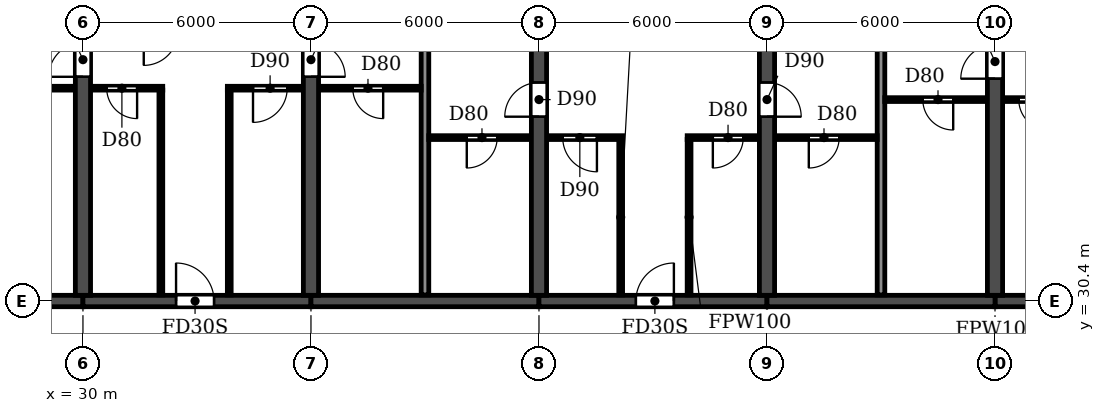
"""IFC4 building model, lengths in metres.
Left out: names, types, materials, properties, quantities, classifications, styles, units other than length and angle.
Written with IfcOpenShell. Run it as: python <this file> out.ifc"""

import sys

from ifc_helpers import new_model, si_unit, direction, frame, frame_2d, origin, place, context, subcontext, project, spatial, rectangle, extrude, element, fill, save


model = new_model("IFC4")
c1 = context("Model", 3, precision=1e-05, world=origin(), true_north=direction((0.0, 1.0)))
c2 = subcontext(c1, "Body", "Model", "MODEL_VIEW")
j1 = project(units=[si_unit("LENGTHUNIT", "METRE"), si_unit("PLANEANGLEUNIT", "RADIAN")], contexts=[c1])
p1 = place(None, origin())
s1 = spatial("IfcSite", under=j1, at=p1, CompositionType="ELEMENT")
p2 = place(p1, origin())
s2 = spatial("IfcBuilding", under=s1, at=p2, CompositionType="ELEMENT")
p3 = place(p2, frame((0.0, 0.0, 43.2)))
s3 = spatial("IfcBuildingStorey", under=s2, at=p3, CompositionType="ELEMENT", Elevation=43.2)
p4 = place(p3, frame((30.0, 30.55, 0.0), z_axis=(0.0, 0.0, 1.0), x_axis=(0.0, 1.0, 0.0)))
e1 = element("IfcWall", 1, at=p4, inside=s3, PredefinedType="SHEAR", context=c2, shape_type="SweptSolid", body=[
    extrude(rectangle(XDim=14.05, YDim=0.4, at=frame_2d((7.025, 0.0))), origin(), (0.0, 0.0, 1.0), 3.05),
])
p5 = place(p4, frame((5.75, 0.0, 0.0)))
e2 = element("IfcOpeningElement", 2, at=p5, cuts=e1, PredefinedType="OPENING", context=c2, shape_type="SweptSolid", body=[
    extrude(rectangle(XDim=0.9, YDim=2.1, at=frame_2d((0.45, 1.05))), frame((0.0, 0.21, 0.0), z_axis=(0.0, -1.0, 0.0), x_axis=(1.0, 0.0, 0.0)), (0.0, 0.0, 1.0), 0.42),
])
p6 = place(p3, frame((36.0, 30.55, 0.0), z_axis=(0.0, 0.0, 1.0), x_axis=(0.0, 1.0, 0.0)))
e3 = element("IfcWall", 3, at=p6, inside=s3, PredefinedType="SHEAR", context=c2, shape_type="SweptSolid", body=[
    extrude(rectangle(XDim=14.05, YDim=0.4, at=frame_2d((7.025, 0.0))), origin(), (0.0, 0.0, 1.0), 3.05),
])
p7 = place(p6, frame((5.75, 0.0, 0.0)))
e4 = element("IfcOpeningElement", 4, at=p7, cuts=e3, PredefinedType="OPENING", context=c2, shape_type="SweptSolid", body=[
    extrude(rectangle(XDim=0.9, YDim=2.1, at=frame_2d((0.45, 1.05))), frame((0.0, 0.21, 0.0), z_axis=(0.0, -1.0, 0.0), x_axis=(1.0, 0.0, 0.0)), (0.0, 0.0, 1.0), 0.42),
])
p8 = place(p3, frame((42.0, 30.55, 0.0), z_axis=(0.0, 0.0, 1.0), x_axis=(0.0, 1.0, 0.0)))
e5 = element("IfcWall", 5, at=p8, inside=s3, PredefinedType="SHEAR", context=c2, shape_type="SweptSolid", body=[
    extrude(rectangle(XDim=14.05, YDim=0.4, at=frame_2d((7.025, 0.0))), origin(), (0.0, 0.0, 1.0), 3.05),
])
p9 = place(p8, frame((4.7, 0.0, 0.0)))
e6 = element("IfcOpeningElement", 6, at=p9, cuts=e5, PredefinedType="OPENING", context=c2, shape_type="SweptSolid", body=[
    extrude(rectangle(XDim=0.9, YDim=2.1, at=frame_2d((0.45, 1.05))), frame((0.0, 0.21, 0.0), z_axis=(0.0, -1.0, 0.0), x_axis=(1.0, 0.0, 0.0)), (0.0, 0.0, 1.0), 0.42),
])
p10 = place(p3, frame((48.0, 30.55, 0.0), z_axis=(0.0, 0.0, 1.0), x_axis=(0.0, 1.0, 0.0)))
e7 = element("IfcWall", 7, at=p10, inside=s3, PredefinedType="SHEAR", context=c2, shape_type="SweptSolid", body=[
    extrude(rectangle(XDim=14.05, YDim=0.4, at=frame_2d((7.025, 0.0))), origin(), (0.0, 0.0, 1.0), 3.05),
])
p11 = place(p10, frame((4.7, 0.0, 0.0)))
e8 = element("IfcOpeningElement", 8, at=p11, cuts=e7, PredefinedType="OPENING", context=c2, shape_type="SweptSolid", body=[
    extrude(rectangle(XDim=0.9, YDim=2.1, at=frame_2d((0.45, 1.05))), frame((0.0, 0.21, 0.0), z_axis=(0.0, -1.0, 0.0), x_axis=(1.0, 0.0, 0.0)), (0.0, 0.0, 1.0), 0.42),
])
p12 = place(p3, frame((54.0, 30.55, 0.0), z_axis=(0.0, 0.0, 1.0), x_axis=(0.0, 1.0, 0.0)))
e9 = element("IfcWall", 9, at=p12, inside=s3, PredefinedType="SHEAR", context=c2, shape_type="SweptSolid", body=[
    extrude(rectangle(XDim=14.05, YDim=0.4, at=frame_2d((7.025, 0.0))), origin(), (0.0, 0.0, 1.0), 3.05),
])
p13 = place(p12, frame((5.7, 0.0, 0.0)))
e10 = element("IfcOpeningElement", 10, at=p13, cuts=e9, PredefinedType="OPENING", context=c2, shape_type="SweptSolid", body=[
    extrude(rectangle(XDim=0.9, YDim=2.1, at=frame_2d((0.45, 1.05))), frame((0.0, 0.21, 0.0), z_axis=(0.0, -1.0, 0.0), x_axis=(1.0, 0.0, 0.0)), (0.0, 0.0, 1.0), 0.42),
])
p14 = place(p3, frame((24.0, 30.4, 0.0), z_axis=(0.0, 0.0, 1.0), x_axis=(1.0, 0.0, 0.0)))
e11 = element("IfcWall", 11, at=p14, inside=s3, PredefinedType="SHEAR", context=c2, shape_type="SweptSolid", body=[
    extrude(rectangle(XDim=6.0, YDim=0.3, at=frame_2d((3.0, 0.0))), origin(), (0.0, 0.0, 1.0), 2.45),
])
p15 = place(p3, frame((30.0, 30.4, 0.0), z_axis=(0.0, 0.0, 1.0), x_axis=(1.0, 0.0, 0.0)))
e12 = element("IfcWall", 12, at=p15, inside=s3, PredefinedType="SHEAR", context=c2, shape_type="SweptSolid", body=[
    extrude(rectangle(XDim=6.0, YDim=0.3, at=frame_2d((3.0, 0.0))), origin(), (0.0, 0.0, 1.0), 2.45),
])
p16 = place(p15, frame((2.45, 0.0, 0.0)))
e13 = element("IfcOpeningElement", 13, at=p16, cuts=e12, PredefinedType="OPENING", context=c2, shape_type="SweptSolid", body=[
    extrude(rectangle(XDim=1.0, YDim=2.1, at=frame_2d((0.5, 1.05))), frame((0.0, 0.16, 0.0), z_axis=(0.0, -1.0, 0.0), x_axis=(1.0, 0.0, 0.0)), (0.0, 0.0, 1.0), 0.32),
])
p17 = place(p3, frame((36.0, 30.4, 0.0), z_axis=(0.0, 0.0, 1.0), x_axis=(1.0, 0.0, 0.0)))
e14 = element("IfcWall", 14, at=p17, inside=s3, PredefinedType="SHEAR", context=c2, shape_type="SweptSolid", body=[
    extrude(rectangle(XDim=6.0, YDim=0.3, at=frame_2d((3.0, 0.0))), origin(), (0.0, 0.0, 1.0), 2.45),
])
p18 = place(p3, frame((42.0, 30.4, 0.0), z_axis=(0.0, 0.0, 1.0), x_axis=(1.0, 0.0, 0.0)))
e15 = element("IfcWall", 15, at=p18, inside=s3, PredefinedType="SHEAR", context=c2, shape_type="SweptSolid", body=[
    extrude(rectangle(XDim=6.0, YDim=0.3, at=frame_2d((3.0, 0.0))), origin(), (0.0, 0.0, 1.0), 2.45),
])
p19 = place(p18, frame((2.55, 0.0, 0.0)))
e16 = element("IfcOpeningElement", 16, at=p19, cuts=e15, PredefinedType="OPENING", context=c2, shape_type="SweptSolid", body=[
    extrude(rectangle(XDim=1.0, YDim=2.1, at=frame_2d((0.5, 1.05))), frame((0.0, 0.16, 0.0), z_axis=(0.0, -1.0, 0.0), x_axis=(1.0, 0.0, 0.0)), (0.0, 0.0, 1.0), 0.32),
])
p20 = place(p3, frame((48.0, 30.4, 0.0), z_axis=(0.0, 0.0, 1.0), x_axis=(1.0, 0.0, 0.0)))
e17 = element("IfcWall", 17, at=p20, inside=s3, PredefinedType="SHEAR", context=c2, shape_type="SweptSolid", body=[
    extrude(rectangle(XDim=6.0, YDim=0.3, at=frame_2d((3.0, 0.0))), origin(), (0.0, 0.0, 1.0), 2.45),
])
p21 = place(p3, frame((54.0, 30.4, 0.0), z_axis=(0.0, 0.0, 1.0), x_axis=(1.0, 0.0, 0.0)))
e18 = element("IfcWall", 18, at=p21, inside=s3, PredefinedType="SHEAR", context=c2, shape_type="SweptSolid", body=[
    extrude(rectangle(XDim=6.0, YDim=0.3, at=frame_2d((3.0, 0.0))), origin(), (0.0, 0.0, 1.0), 2.45),
])
p22 = place(p21, frame((2.45, 0.0, 0.0)))
e19 = element("IfcOpeningElement", 19, at=p22, cuts=e18, PredefinedType="OPENING", context=c2, shape_type="SweptSolid", body=[
    extrude(rectangle(XDim=1.0, YDim=2.1, at=frame_2d((0.5, 1.05))), frame((0.0, 0.16, 0.0), z_axis=(0.0, -1.0, 0.0), x_axis=(1.0, 0.0, 0.0)), (0.0, 0.0, 1.0), 0.32),
])
for number, where, z_axis, x_axis in (
    (20, (39.0, 30.56, 0.0), (0.0, 0.0, 1.0), (0.0, 1.0, 0.0)),
    (21, (51.0, 30.56, 0.0), (0.0, 0.0, 1.0), (0.0, 1.0, 0.0)),
):
    element("IfcWall", number, at=place(p3, frame(where, z_axis=z_axis, x_axis=x_axis)), inside=s3, PredefinedType="PARTITIONING", context=c2, shape_type="SweptSolid", body=[
        extrude(rectangle(XDim=14.18, YDim=0.2, at=frame_2d((7.09, 0.0))), origin(), (0.0, 0.0, 1.0), 3.05),
    ])
p23 = place(p3, frame((39.1, 34.7, 0.0), z_axis=(0.0, 0.0, 1.0), x_axis=(1.0, 0.0, 0.0)))
e22 = element("IfcWall", 22, at=p23, inside=s3, PredefinedType="PARTITIONING", context=c2, shape_type="SweptSolid", body=[
    extrude(rectangle(XDim=2.69, YDim=0.1, at=frame_2d((1.345, 0.0))), origin(), (0.0, 0.0, 1.0), 3.05),
])
p24 = place(p23, frame((1.0, 0.0, 0.0)))
e23 = element("IfcOpeningElement", 23, at=p24, cuts=e22, PredefinedType="OPENING", context=c2, shape_type="SweptSolid", body=[
    extrude(rectangle(XDim=0.8, YDim=2.1, at=frame_2d((0.4, 1.05))), frame((0.0, 0.06, 0.0), z_axis=(0.0, -1.0, 0.0), x_axis=(1.0, 0.0, 0.0)), (0.0, 0.0, 1.0), 0.12),
])
p25 = place(p3, frame((42.21, 34.7, 0.0), z_axis=(0.0, 0.0, 1.0), x_axis=(1.0, 0.0, 0.0)))
e24 = element("IfcWall", 24, at=p25, inside=s3, PredefinedType="PARTITIONING", context=c2, shape_type="SweptSolid", body=[
    extrude(rectangle(XDim=1.99, YDim=0.1, at=frame_2d((0.995, 0.0))), origin(), (0.0, 0.0, 1.0), 3.05),
])
p26 = place(p25, frame((0.415, 0.0, 0.0)))
e25 = element("IfcOpeningElement", 25, at=p26, cuts=e24, PredefinedType="OPENING", context=c2, shape_type="SweptSolid", body=[
    extrude(rectangle(XDim=0.9, YDim=2.1, at=frame_2d((0.45, 1.05))), frame((0.0, 0.06, 0.0), z_axis=(0.0, -1.0, 0.0), x_axis=(1.0, 0.0, 0.0)), (0.0, 0.0, 1.0), 0.12),
])
p27 = place(p3, frame((45.9, 34.7, 0.0), z_axis=(0.0, 0.0, 1.0), x_axis=(1.0, 0.0, 0.0)))
e26 = element("IfcWall", 26, at=p27, inside=s3, PredefinedType="PARTITIONING", context=c2, shape_type="SweptSolid", body=[
    extrude(rectangle(XDim=1.89, YDim=0.1, at=frame_2d((0.945, 0.0))), origin(), (0.0, 0.0, 1.0), 3.05),
])
p28 = place(p27, frame((0.675, 0.0, 0.0)))
e27 = element("IfcOpeningElement", 27, at=p28, cuts=e26, PredefinedType="OPENING", context=c2, shape_type="SweptSolid", body=[
    extrude(rectangle(XDim=0.8, YDim=2.1, at=frame_2d((0.4, 1.05))), frame((0.0, 0.06, 0.0), z_axis=(0.0, -1.0, 0.0), x_axis=(1.0, 0.0, 0.0)), (0.0, 0.0, 1.0), 0.12),
])
p29 = place(p3, frame((48.21, 34.7, 0.0), z_axis=(0.0, 0.0, 1.0), x_axis=(1.0, 0.0, 0.0)))
e28 = element("IfcWall", 28, at=p29, inside=s3, PredefinedType="PARTITIONING", context=c2, shape_type="SweptSolid", body=[
    extrude(rectangle(XDim=2.69, YDim=0.1, at=frame_2d((1.345, 0.0))), origin(), (0.0, 0.0, 1.0), 3.05),
])
p30 = place(p29, frame((0.89, 0.0, 0.0)))
e29 = element("IfcOpeningElement", 29, at=p30, cuts=e28, PredefinedType="OPENING", context=c2, shape_type="SweptSolid", body=[
    extrude(rectangle(XDim=0.8, YDim=2.1, at=frame_2d((0.4, 1.05))), frame((0.0, 0.06, 0.0), z_axis=(0.0, -1.0, 0.0), x_axis=(1.0, 0.0, 0.0)), (0.0, 0.0, 1.0), 0.12),
])
p31 = place(p3, frame((51.1, 35.7, 0.0), z_axis=(0.0, 0.0, 1.0), x_axis=(1.0, 0.0, 0.0)))
e30 = element("IfcWall", 30, at=p31, inside=s3, PredefinedType="PARTITIONING", context=c2, shape_type="SweptSolid", body=[
    extrude(rectangle(XDim=2.69, YDim=0.1, at=frame_2d((1.345, 0.0))), origin(), (0.0, 0.0, 1.0), 3.05),
])
p32 = place(p31, frame((1.0, 0.0, 0.0)))
e31 = element("IfcOpeningElement", 31, at=p32, cuts=e30, PredefinedType="OPENING", context=c2, shape_type="SweptSolid", body=[
    extrude(rectangle(XDim=0.8, YDim=2.1, at=frame_2d((0.4, 1.05))), frame((0.0, 0.06, 0.0), z_axis=(0.0, -1.0, 0.0), x_axis=(1.0, 0.0, 0.0)), (0.0, 0.0, 1.0), 0.12),
])
p33 = place(p3, frame((54.21, 35.7, 0.0), z_axis=(0.0, 0.0, 1.0), x_axis=(1.0, 0.0, 0.0)))
e32 = element("IfcWall", 32, at=p33, inside=s3, PredefinedType="PARTITIONING", context=c2, shape_type="SweptSolid", body=[
    extrude(rectangle(XDim=1.89, YDim=0.1, at=frame_2d((0.945, 0.0))), origin(), (0.0, 0.0, 1.0), 3.05),
])
p34 = place(p33, frame((0.415, 0.0, 0.0)))
e33 = element("IfcOpeningElement", 33, at=p34, cuts=e32, PredefinedType="OPENING", context=c2, shape_type="SweptSolid", body=[
    extrude(rectangle(XDim=0.8, YDim=2.1, at=frame_2d((0.4, 1.05))), frame((0.0, 0.06, 0.0), z_axis=(0.0, -1.0, 0.0), x_axis=(1.0, 0.0, 0.0)), (0.0, 0.0, 1.0), 0.12),
])
p35 = place(p3, frame((27.1, 36.0, 0.0), z_axis=(0.0, 0.0, 1.0), x_axis=(1.0, 0.0, 0.0)))
e34 = element("IfcWall", 34, at=p35, inside=s3, PredefinedType="PARTITIONING", context=c2, shape_type="SweptSolid", body=[
    extrude(rectangle(XDim=2.69, YDim=0.1, at=frame_2d((1.345, 0.0))), origin(), (0.0, 0.0, 1.0), 3.05),
])
p36 = place(p35, frame((1.0, 0.0, 0.0)))
e35 = element("IfcOpeningElement", 35, at=p36, cuts=e34, PredefinedType="OPENING", context=c2, shape_type="SweptSolid", body=[
    extrude(rectangle(XDim=0.8, YDim=2.1, at=frame_2d((0.4, 1.05))), frame((0.0, 0.06, 0.0), z_axis=(0.0, -1.0, 0.0), x_axis=(1.0, 0.0, 0.0)), (0.0, 0.0, 1.0), 0.12),
])
p37 = place(p3, frame((30.21, 36.0, 0.0), z_axis=(0.0, 0.0, 1.0), x_axis=(1.0, 0.0, 0.0)))
e36 = element("IfcWall", 36, at=p37, inside=s3, PredefinedType="PARTITIONING", context=c2, shape_type="SweptSolid", body=[
    extrude(rectangle(XDim=1.89, YDim=0.1, at=frame_2d((0.945, 0.0))), origin(), (0.0, 0.0, 1.0), 3.05),
])
p38 = place(p37, frame((0.415, 0.0, 0.0)))
e37 = element("IfcOpeningElement", 37, at=p38, cuts=e36, PredefinedType="OPENING", context=c2, shape_type="SweptSolid", body=[
    extrude(rectangle(XDim=0.8, YDim=2.1, at=frame_2d((0.4, 1.05))), frame((0.0, 0.06, 0.0), z_axis=(0.0, -1.0, 0.0), x_axis=(1.0, 0.0, 0.0)), (0.0, 0.0, 1.0), 0.12),
])
p39 = place(p3, frame((33.8, 36.0, 0.0), z_axis=(0.0, 0.0, 1.0), x_axis=(1.0, 0.0, 0.0)))
e38 = element("IfcWall", 38, at=p39, inside=s3, PredefinedType="PARTITIONING", context=c2, shape_type="SweptSolid", body=[
    extrude(rectangle(XDim=1.99, YDim=0.1, at=frame_2d((0.995, 0.0))), origin(), (0.0, 0.0, 1.0), 3.05),
])
p40 = place(p39, frame((0.675, 0.0, 0.0)))
e39 = element("IfcOpeningElement", 39, at=p40, cuts=e38, PredefinedType="OPENING", context=c2, shape_type="SweptSolid", body=[
    extrude(rectangle(XDim=0.9, YDim=2.1, at=frame_2d((0.45, 1.05))), frame((0.0, 0.06, 0.0), z_axis=(0.0, -1.0, 0.0), x_axis=(1.0, 0.0, 0.0)), (0.0, 0.0, 1.0), 0.12),
])
p41 = place(p3, frame((36.21, 36.0, 0.0), z_axis=(0.0, 0.0, 1.0), x_axis=(1.0, 0.0, 0.0)))
e40 = element("IfcWall", 40, at=p41, inside=s3, PredefinedType="PARTITIONING", context=c2, shape_type="SweptSolid", body=[
    extrude(rectangle(XDim=2.69, YDim=0.1, at=frame_2d((1.345, 0.0))), origin(), (0.0, 0.0, 1.0), 3.05),
])
p42 = place(p41, frame((0.89, 0.0, 0.0)))
e41 = element("IfcOpeningElement", 41, at=p42, cuts=e40, PredefinedType="OPENING", context=c2, shape_type="SweptSolid", body=[
    extrude(rectangle(XDim=0.8, YDim=2.1, at=frame_2d((0.4, 1.05))), frame((0.0, 0.06, 0.0), z_axis=(0.0, -1.0, 0.0), x_axis=(1.0, 0.0, 0.0)), (0.0, 0.0, 1.0), 0.12),
])
for number, where, z_axis, x_axis in (
    (42, (32.05, 30.56, 0.0), (0.0, 0.0, 1.0), (0.0, 1.0, 0.0)),
    (43, (33.85, 30.56, 0.0), (0.0, 0.0, 1.0), (0.0, 1.0, 0.0)),
):
    element("IfcWall", number, at=place(p3, frame(where, z_axis=z_axis, x_axis=x_axis)), inside=s3, PredefinedType="PARTITIONING", context=c2, shape_type="SweptSolid", body=[
        extrude(rectangle(XDim=5.39, YDim=0.1, at=frame_2d((2.695, 0.0))), origin(), (0.0, 0.0, 1.0), 3.05),
    ])
for number, where, z_axis, x_axis in (
    (44, (44.15, 30.56, 0.0), (0.0, 0.0, 1.0), (0.0, 1.0, 0.0)),
    (45, (45.95, 30.56, 0.0), (0.0, 0.0, 1.0), (0.0, 1.0, 0.0)),
):
    element("IfcWall", number, at=place(p3, frame(where, z_axis=z_axis, x_axis=x_axis)), inside=s3, PredefinedType="PARTITIONING", context=c2, shape_type="SweptSolid", body=[
        extrude(rectangle(XDim=4.09, YDim=0.1, at=frame_2d((2.045, 0.0))), origin(), (0.0, 0.0, 1.0), 3.05),
    ])
p43 = place(p42, frame((0.8, 0.0, 0.0), z_axis=(0.0, 0.0, 1.0), x_axis=(-1.0, 0.0, 0.0)))
e46 = element("IfcDoor", 46, at=p43, inside=s3, OperationType="SINGLE_SWING_LEFT", PredefinedType="DOOR", context=c2, shape_type="SweptSolid", body=[
    extrude(rectangle(XDim=0.8, YDim=2.1, at=frame_2d((0.4, 1.05))), frame((0.0, 0.025, 0.0), z_axis=(0.0, -1.0, 0.0), x_axis=(1.0, 0.0, 0.0)), (0.0, 0.0, 1.0), 0.05),
])
fill(e41, e46)
p44 = place(p5, origin())
e47 = element("IfcDoor", 47, at=p44, inside=s3, OperationType="SINGLE_SWING_LEFT", PredefinedType="DOOR", context=c2, shape_type="SweptSolid", body=[
    extrude(rectangle(XDim=0.9, YDim=2.1, at=frame_2d((0.45, 1.05))), frame((0.0, 0.025, 0.0), z_axis=(0.0, -1.0, 0.0), x_axis=(1.0, 0.0, 0.0)), (0.0, 0.0, 1.0), 0.05),
])
fill(e2, e47)
p45 = place(p38, frame((0.8, 0.0, 0.0), z_axis=(0.0, 0.0, 1.0), x_axis=(-1.0, 0.0, 0.0)))
e48 = element("IfcDoor", 48, at=p45, inside=s3, OperationType="SINGLE_SWING_LEFT", PredefinedType="DOOR", context=c2, shape_type="SweptSolid", body=[
    extrude(rectangle(XDim=0.8, YDim=2.1, at=frame_2d((0.4, 1.05))), frame((0.0, 0.025, 0.0), z_axis=(0.0, -1.0, 0.0), x_axis=(1.0, 0.0, 0.0)), (0.0, 0.0, 1.0), 0.05),
])
fill(e37, e48)
p46 = place(p16, origin())
e49 = element("IfcDoor", 49, at=p46, inside=s3, OperationType="SINGLE_SWING_LEFT", PredefinedType="DOOR", context=c2, shape_type="SweptSolid", body=[
    extrude(rectangle(XDim=1.0, YDim=2.1, at=frame_2d((0.5, 1.05))), frame((0.0, 0.025, 0.0), z_axis=(0.0, -1.0, 0.0), x_axis=(1.0, 0.0, 0.0)), (0.0, 0.0, 1.0), 0.05),
])
fill(e13, e49)
p47 = place(p40, frame((0.9, 0.0, 0.0), z_axis=(0.0, 0.0, 1.0), x_axis=(-1.0, 0.0, 0.0)))
e50 = element("IfcDoor", 50, at=p47, inside=s3, OperationType="SINGLE_SWING_RIGHT", PredefinedType="DOOR", context=c2, shape_type="SweptSolid", body=[
    extrude(rectangle(XDim=0.9, YDim=2.1, at=frame_2d((0.45, 1.05))), frame((0.0, 0.025, 0.0), z_axis=(0.0, -1.0, 0.0), x_axis=(1.0, 0.0, 0.0)), (0.0, 0.0, 1.0), 0.05),
])
fill(e39, e50)
p48 = place(p7, frame((0.9, 0.0, 0.0), z_axis=(0.0, 0.0, 1.0), x_axis=(-1.0, 0.0, 0.0)))
e51 = element("IfcDoor", 51, at=p48, inside=s3, OperationType="SINGLE_SWING_RIGHT", PredefinedType="DOOR", context=c2, shape_type="SweptSolid", body=[
    extrude(rectangle(XDim=0.9, YDim=2.1, at=frame_2d((0.45, 1.05))), frame((0.0, 0.025, 0.0), z_axis=(0.0, -1.0, 0.0), x_axis=(1.0, 0.0, 0.0)), (0.0, 0.0, 1.0), 0.05),
])
fill(e4, e51)
p49 = place(p24, frame((0.8, 0.0, 0.0), z_axis=(0.0, 0.0, 1.0), x_axis=(-1.0, 0.0, 0.0)))
e52 = element("IfcDoor", 52, at=p49, inside=s3, OperationType="SINGLE_SWING_RIGHT", PredefinedType="DOOR", context=c2, shape_type="SweptSolid", body=[
    extrude(rectangle(XDim=0.8, YDim=2.1, at=frame_2d((0.4, 1.05))), frame((0.0, 0.025, 0.0), z_axis=(0.0, -1.0, 0.0), x_axis=(1.0, 0.0, 0.0)), (0.0, 0.0, 1.0), 0.05),
])
fill(e23, e52)
p50 = place(p30, frame((0.8, 0.0, 0.0), z_axis=(0.0, 0.0, 1.0), x_axis=(-1.0, 0.0, 0.0)))
e53 = element("IfcDoor", 53, at=p50, inside=s3, OperationType="SINGLE_SWING_RIGHT", PredefinedType="DOOR", context=c2, shape_type="SweptSolid", body=[
    extrude(rectangle(XDim=0.8, YDim=2.1, at=frame_2d((0.4, 1.05))), frame((0.0, 0.025, 0.0), z_axis=(0.0, -1.0, 0.0), x_axis=(1.0, 0.0, 0.0)), (0.0, 0.0, 1.0), 0.05),
])
fill(e29, e53)
p51 = place(p9, origin())
e54 = element("IfcDoor", 54, at=p51, inside=s3, OperationType="SINGLE_SWING_LEFT", PredefinedType="DOOR", context=c2, shape_type="SweptSolid", body=[
    extrude(rectangle(XDim=0.9, YDim=2.1, at=frame_2d((0.45, 1.05))), frame((0.0, 0.025, 0.0), z_axis=(0.0, -1.0, 0.0), x_axis=(1.0, 0.0, 0.0)), (0.0, 0.0, 1.0), 0.05),
])
fill(e6, e54)
p52 = place(p26, frame((0.9, 0.0, 0.0), z_axis=(0.0, 0.0, 1.0), x_axis=(-1.0, 0.0, 0.0)))
e55 = element("IfcDoor", 55, at=p52, inside=s3, OperationType="SINGLE_SWING_LEFT", PredefinedType="DOOR", context=c2, shape_type="SweptSolid", body=[
    extrude(rectangle(XDim=0.9, YDim=2.1, at=frame_2d((0.45, 1.05))), frame((0.0, 0.025, 0.0), z_axis=(0.0, -1.0, 0.0), x_axis=(1.0, 0.0, 0.0)), (0.0, 0.0, 1.0), 0.05),
])
fill(e25, e55)
p53 = place(p19, origin())
e56 = element("IfcDoor", 56, at=p53, inside=s3, OperationType="SINGLE_SWING_RIGHT", PredefinedType="DOOR", context=c2, shape_type="SweptSolid", body=[
    extrude(rectangle(XDim=1.0, YDim=2.1, at=frame_2d((0.5, 1.05))), frame((0.0, 0.025, 0.0), z_axis=(0.0, -1.0, 0.0), x_axis=(1.0, 0.0, 0.0)), (0.0, 0.0, 1.0), 0.05),
])
fill(e16, e56)
p54 = place(p28, frame((0.8, 0.0, 0.0), z_axis=(0.0, 0.0, 1.0), x_axis=(-1.0, 0.0, 0.0)))
e57 = element("IfcDoor", 57, at=p54, inside=s3, OperationType="SINGLE_SWING_RIGHT", PredefinedType="DOOR", context=c2, shape_type="SweptSolid", body=[
    extrude(rectangle(XDim=0.8, YDim=2.1, at=frame_2d((0.4, 1.05))), frame((0.0, 0.025, 0.0), z_axis=(0.0, -1.0, 0.0), x_axis=(1.0, 0.0, 0.0)), (0.0, 0.0, 1.0), 0.05),
])
fill(e27, e57)
p55 = place(p11, frame((0.9, 0.0, 0.0), z_axis=(0.0, 0.0, 1.0), x_axis=(-1.0, 0.0, 0.0)))
e58 = element("IfcDoor", 58, at=p55, inside=s3, OperationType="SINGLE_SWING_RIGHT", PredefinedType="DOOR", context=c2, shape_type="SweptSolid", body=[
    extrude(rectangle(XDim=0.9, YDim=2.1, at=frame_2d((0.45, 1.05))), frame((0.0, 0.025, 0.0), z_axis=(0.0, -1.0, 0.0), x_axis=(1.0, 0.0, 0.0)), (0.0, 0.0, 1.0), 0.05),
])
fill(e8, e58)
p56 = place(p32, frame((0.8, 0.0, 0.0), z_axis=(0.0, 0.0, 1.0), x_axis=(-1.0, 0.0, 0.0)))
e59 = element("IfcDoor", 59, at=p56, inside=s3, OperationType="SINGLE_SWING_LEFT", PredefinedType="DOOR", context=c2, shape_type="SweptSolid", body=[
    extrude(rectangle(XDim=0.8, YDim=2.1, at=frame_2d((0.4, 1.05))), frame((0.0, 0.025, 0.0), z_axis=(0.0, -1.0, 0.0), x_axis=(1.0, 0.0, 0.0)), (0.0, 0.0, 1.0), 0.05),
])
fill(e31, e59)
p57 = place(p13, origin())
e60 = element("IfcDoor", 60, at=p57, inside=s3, OperationType="SINGLE_SWING_LEFT", PredefinedType="DOOR", context=c2, shape_type="SweptSolid", body=[
    extrude(rectangle(XDim=0.9, YDim=2.1, at=frame_2d((0.45, 1.05))), frame((0.0, 0.025, 0.0), z_axis=(0.0, -1.0, 0.0), x_axis=(1.0, 0.0, 0.0)), (0.0, 0.0, 1.0), 0.05),
])
fill(e10, e60)
p58 = place(p34, frame((0.8, 0.0, 0.0), z_axis=(0.0, 0.0, 1.0), x_axis=(-1.0, 0.0, 0.0)))
e61 = element("IfcDoor", 61, at=p58, inside=s3, OperationType="SINGLE_SWING_LEFT", PredefinedType="DOOR", context=c2, shape_type="SweptSolid", body=[
    extrude(rectangle(XDim=0.8, YDim=2.1, at=frame_2d((0.4, 1.05))), frame((0.0, 0.025, 0.0), z_axis=(0.0, -1.0, 0.0), x_axis=(1.0, 0.0, 0.0)), (0.0, 0.0, 1.0), 0.05),
])
fill(e33, e61)
save(model, sys.argv[1])
